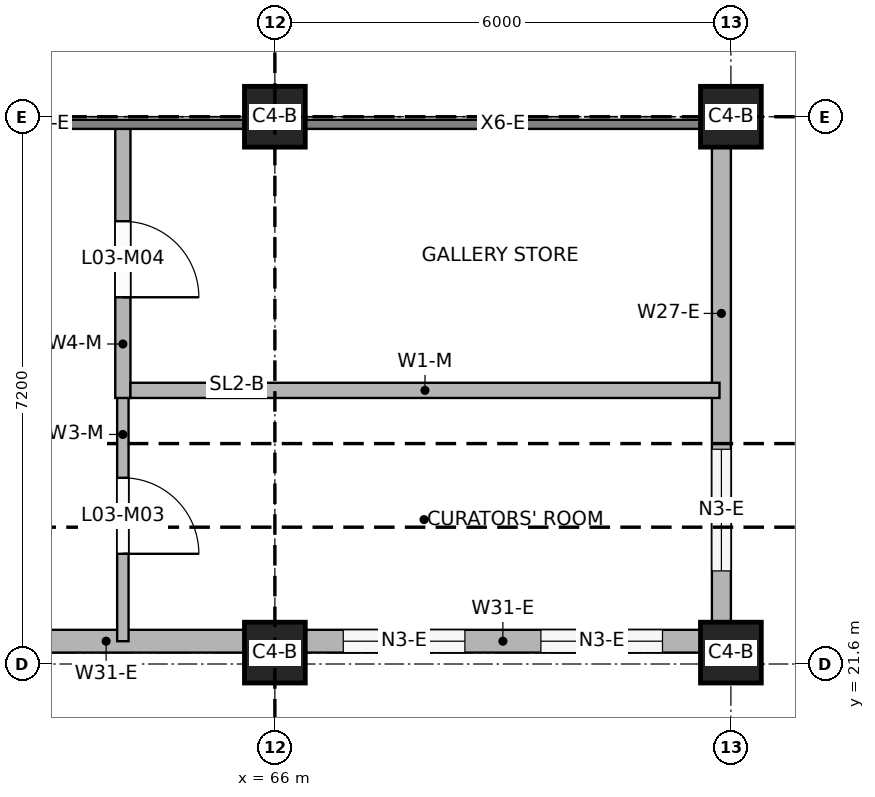
"""IFC4 building model, lengths in metres.
Left out: names, types, materials, properties, quantities, classifications, styles, units other than length and angle.
Written with IfcOpenShell. Run it as: python <this file> out.ifc"""

import sys

from ifc_helpers import new_model, si_unit, direction, frame, frame_2d, origin, origin_2d, place, context, subcontext, project, spatial, rectangle, extrude, element, fill, save


model = new_model("IFC4")
c1 = context("Model", 3, precision=1e-05, world=origin(), true_north=direction((0.0, 1.0)))
c2 = subcontext(c1, "Body", "Model", "MODEL_VIEW")
j1 = project(units=[si_unit("LENGTHUNIT", "METRE"), si_unit("PLANEANGLEUNIT", "RADIAN")], contexts=[c1])
p1 = place(None, origin())
s1 = spatial("IfcSite", under=j1, at=p1, CompositionType="ELEMENT")
p2 = place(p1, origin())
s2 = spatial("IfcBuilding", under=s1, at=p2, CompositionType="ELEMENT")
p3 = place(p2, frame((0.0, 0.0, 12.6)))
s3 = spatial("IfcBuildingStorey", under=s2, at=p3, CompositionType="ELEMENT", Elevation=12.6)
for number, where, z_axis, x_axis in (
    (1, (66.0, 21.75, 0.0), (0.0, 0.0, 1.0), (1.0, 0.0, 0.0)),
    (2, (72.0, 21.75, 0.0), (0.0, 0.0, 1.0), (1.0, 0.0, 0.0)),
    (3, (66.0, 28.8, 0.0), (0.0, 0.0, 1.0), (1.0, 0.0, 0.0)),
    (4, (72.0, 28.8, 0.0), (0.0, 0.0, 1.0), (1.0, 0.0, 0.0)),
):
    element("IfcColumn", number, at=place(p3, frame(where, z_axis=z_axis, x_axis=x_axis)), inside=s3, PredefinedType="COLUMN", context=c2, shape_type="SweptSolid", body=[
        extrude(rectangle(XDim=0.8, YDim=0.8, at=origin_2d()), origin(), (0.0, 0.0, 1.0), 3.95),
    ])
p4 = place(p3, frame((71.875, 22.15, 0.0), z_axis=(0.0, 0.0, 1.0), x_axis=(0.0, 1.0, 0.0)))
e5 = element("IfcWall", 5, at=p4, inside=s3, PredefinedType="SOLIDWALL", context=c2, shape_type="SweptSolid", body=[
    extrude(rectangle(XDim=6.25, YDim=0.25, at=frame_2d((3.125, 0.0))), origin(), (0.0, 0.0, 1.0), 3.05),
])
p5 = place(p4, frame((0.675, 0.0, 0.9)))
e6 = element("IfcOpeningElement", 6, at=p5, cuts=e5, PredefinedType="OPENING", context=c2, shape_type="SweptSolid", body=[
    extrude(rectangle(XDim=1.6, YDim=1.9, at=frame_2d((0.8, 0.95))), frame((0.0, 0.135, 0.0), z_axis=(0.0, -1.0, 0.0), x_axis=(1.0, 0.0, 0.0)), (0.0, 0.0, 1.0), 0.27),
])
p6 = place(p3, frame((60.4, 21.9, 0.0), z_axis=(0.0, 0.0, 1.0), x_axis=(1.0, 0.0, 0.0)))
e7 = element("IfcWall", 7, at=p6, inside=s3, PredefinedType="SOLIDWALL", context=c2, shape_type="SweptSolid", body=[
    extrude(rectangle(XDim=5.2, YDim=0.3, at=frame_2d((2.6, 0.0))), origin(), (0.0, 0.0, 1.0), 3.15),
])
p7 = place(p6, frame((0.95, 0.0, 0.9)))
e8 = element("IfcOpeningElement", 8, at=p7, cuts=e7, PredefinedType="OPENING", context=c2, shape_type="SweptSolid", body=[
    extrude(rectangle(XDim=1.6, YDim=1.9, at=frame_2d((0.8, 0.95))), frame((0.0, 0.16, 0.0), z_axis=(0.0, -1.0, 0.0), x_axis=(1.0, 0.0, 0.0)), (0.0, 0.0, 1.0), 0.32),
])
p8 = place(p3, frame((66.4, 21.9, 0.0), z_axis=(0.0, 0.0, 1.0), x_axis=(1.0, 0.0, 0.0)))
e9 = element("IfcWall", 9, at=p8, inside=s3, PredefinedType="SOLIDWALL", context=c2, shape_type="SweptSolid", body=[
    extrude(rectangle(XDim=5.2, YDim=0.3, at=frame_2d((2.6, 0.0))), origin(), (0.0, 0.0, 1.0), 3.15),
])
p9 = place(p8, frame((0.5, 0.0, 0.9)))
e10 = element("IfcOpeningElement", 10, at=p9, cuts=e9, PredefinedType="OPENING", context=c2, shape_type="SweptSolid", body=[
    extrude(rectangle(XDim=1.6, YDim=1.9, at=frame_2d((0.8, 0.95))), frame((0.0, 0.16, 0.0), z_axis=(0.0, -1.0, 0.0), x_axis=(1.0, 0.0, 0.0)), (0.0, 0.0, 1.0), 0.32),
])
p10 = place(p8, frame((3.1, 0.0, 0.9)))
e11 = element("IfcOpeningElement", 11, at=p10, cuts=e9, PredefinedType="OPENING", context=c2, shape_type="SweptSolid", body=[
    extrude(rectangle(XDim=1.6, YDim=1.9, at=frame_2d((0.8, 0.95))), frame((0.0, 0.16, 0.0), z_axis=(0.0, -1.0, 0.0), x_axis=(1.0, 0.0, 0.0)), (0.0, 0.0, 1.0), 0.32),
])
p11 = place(p3, frame((71.91, 7.2, 0.0), z_axis=(0.0, 0.0, 1.0), x_axis=(0.0, 1.0, 0.0)))
e12 = element("IfcWall", 12, at=p11, inside=s3, PredefinedType="PARAPET", context=c2, shape_type="SweptSolid", body=[
    extrude(rectangle(XDim=14.4, YDim=0.18, at=frame_2d((7.2, 0.0))), origin(), (0.0, 0.0, 1.0), 1.1),
])
p12 = place(p3, frame((54.0, 21.51, 0.0), z_axis=(0.0, 0.0, 1.0), x_axis=(1.0, 0.0, 0.0)))
e13 = element("IfcWall", 13, at=p12, inside=s3, PredefinedType="PARAPET", context=c2, shape_type="SweptSolid", body=[
    extrude(rectangle(XDim=18.0, YDim=0.18, at=frame_2d((9.0, 0.0))), origin(), (0.0, 0.0, 1.0), 1.1),
])
p13 = place(p3, frame((64.0, 21.9, 0.0), z_axis=(0.0, 0.0, 1.0), x_axis=(0.0, 1.0, 0.0)))
e14 = element("IfcWall", 14, at=p13, inside=s3, PredefinedType="PARTITIONING", context=c2, shape_type="SweptSolid", body=[
    extrude(rectangle(XDim=3.4, YDim=0.15, at=frame_2d((1.7, 0.0))), origin(), (0.0, 0.0, 1.0), 3.15),
])
p14 = place(p13, frame((1.15, 0.0, 0.0)))
e15 = element("IfcOpeningElement", 15, at=p14, cuts=e14, PredefinedType="OPENING", context=c2, shape_type="SweptSolid", body=[
    extrude(rectangle(XDim=1.0, YDim=2.1, at=frame_2d((0.5, 1.05))), frame((0.0, 0.085, 0.0), z_axis=(0.0, -1.0, 0.0), x_axis=(1.0, 0.0, 0.0)), (0.0, 0.0, 1.0), 0.17),
])
p15 = place(p3, frame((64.0, 25.1, 0.0), z_axis=(0.0, 0.0, 1.0), x_axis=(0.0, 1.0, 0.0)))
e16 = element("IfcWall", 16, at=p15, inside=s3, PredefinedType="PARTITIONING", context=c2, shape_type="SweptSolid", body=[
    extrude(rectangle(XDim=3.55, YDim=0.2, at=frame_2d((1.775, 0.0))), origin(), (0.0, 0.0, 1.0), 3.15),
])
p16 = place(p15, frame((1.325, 0.0, 0.0)))
e17 = element("IfcOpeningElement", 17, at=p16, cuts=e16, PredefinedType="OPENING", context=c2, shape_type="SweptSolid", body=[
    extrude(rectangle(XDim=1.0, YDim=2.1, at=frame_2d((0.5, 1.05))), frame((0.0, 0.11, 0.0), z_axis=(0.0, -1.0, 0.0), x_axis=(1.0, 0.0, 0.0)), (0.0, 0.0, 1.0), 0.22),
])
p17 = place(p3, frame((64.1, 25.2, 0.0), z_axis=(0.0, 0.0, 1.0), x_axis=(1.0, 0.0, 0.0)))
e18 = element("IfcWall", 18, at=p17, inside=s3, PredefinedType="PARTITIONING", context=c2, shape_type="SweptSolid", body=[
    extrude(rectangle(XDim=7.75, YDim=0.2, at=frame_2d((3.875, 0.0))), origin(), (0.0, 0.0, 1.0), 3.05),
])
p18 = place(p5, origin())
e19 = element("IfcWindow", 19, at=p18, inside=s3, PartitioningType="SINGLE_PANEL", PredefinedType="WINDOW", context=c2, shape_type="SweptSolid", body=[
    extrude(rectangle(XDim=1.6, YDim=1.9, at=frame_2d((0.8, 0.95))), frame((0.0, 0.03, 0.0), z_axis=(0.0, -1.0, 0.0), x_axis=(1.0, 0.0, 0.0)), (0.0, 0.0, 1.0), 0.06),
])
fill(e6, e19)
p19 = place(p9, origin())
e20 = element("IfcWindow", 20, at=p19, inside=s3, PartitioningType="SINGLE_PANEL", PredefinedType="WINDOW", context=c2, shape_type="SweptSolid", body=[
    extrude(rectangle(XDim=1.6, YDim=1.9, at=frame_2d((0.8, 0.95))), frame((0.0, 0.03, 0.0), z_axis=(0.0, -1.0, 0.0), x_axis=(1.0, 0.0, 0.0)), (0.0, 0.0, 1.0), 0.06),
])
fill(e10, e20)
p20 = place(p10, origin())
e21 = element("IfcWindow", 21, at=p20, inside=s3, PartitioningType="SINGLE_PANEL", PredefinedType="WINDOW", context=c2, shape_type="SweptSolid", body=[
    extrude(rectangle(XDim=1.6, YDim=1.9, at=frame_2d((0.8, 0.95))), frame((0.0, 0.03, 0.0), z_axis=(0.0, -1.0, 0.0), x_axis=(1.0, 0.0, 0.0)), (0.0, 0.0, 1.0), 0.06),
])
fill(e11, e21)
p21 = place(p14, frame((1.0, 0.0, 0.0), z_axis=(0.0, 0.0, 1.0), x_axis=(-1.0, 0.0, 0.0)))
e22 = element("IfcDoor", 22, at=p21, inside=s3, OperationType="SINGLE_SWING_RIGHT", PredefinedType="DOOR", context=c2, shape_type="SweptSolid", body=[
    extrude(rectangle(XDim=1.0, YDim=2.1, at=frame_2d((0.5, 1.05))), frame((0.0, 0.025, 0.0), z_axis=(0.0, -1.0, 0.0), x_axis=(1.0, 0.0, 0.0)), (0.0, 0.0, 1.0), 0.05),
])
fill(e15, e22)
p22 = place(p16, frame((1.0, 0.0, 0.0), z_axis=(0.0, 0.0, 1.0), x_axis=(-1.0, 0.0, 0.0)))
e23 = element("IfcDoor", 23, at=p22, inside=s3, OperationType="SINGLE_SWING_RIGHT", PredefinedType="DOOR", context=c2, shape_type="SweptSolid", body=[
    extrude(rectangle(XDim=1.0, YDim=2.1, at=frame_2d((0.5, 1.05))), frame((0.0, 0.025, 0.0), z_axis=(0.0, -1.0, 0.0), x_axis=(1.0, 0.0, 0.0)), (0.0, 0.0, 1.0), 0.05),
])
fill(e17, e23)
save(model, sys.argv[1])
